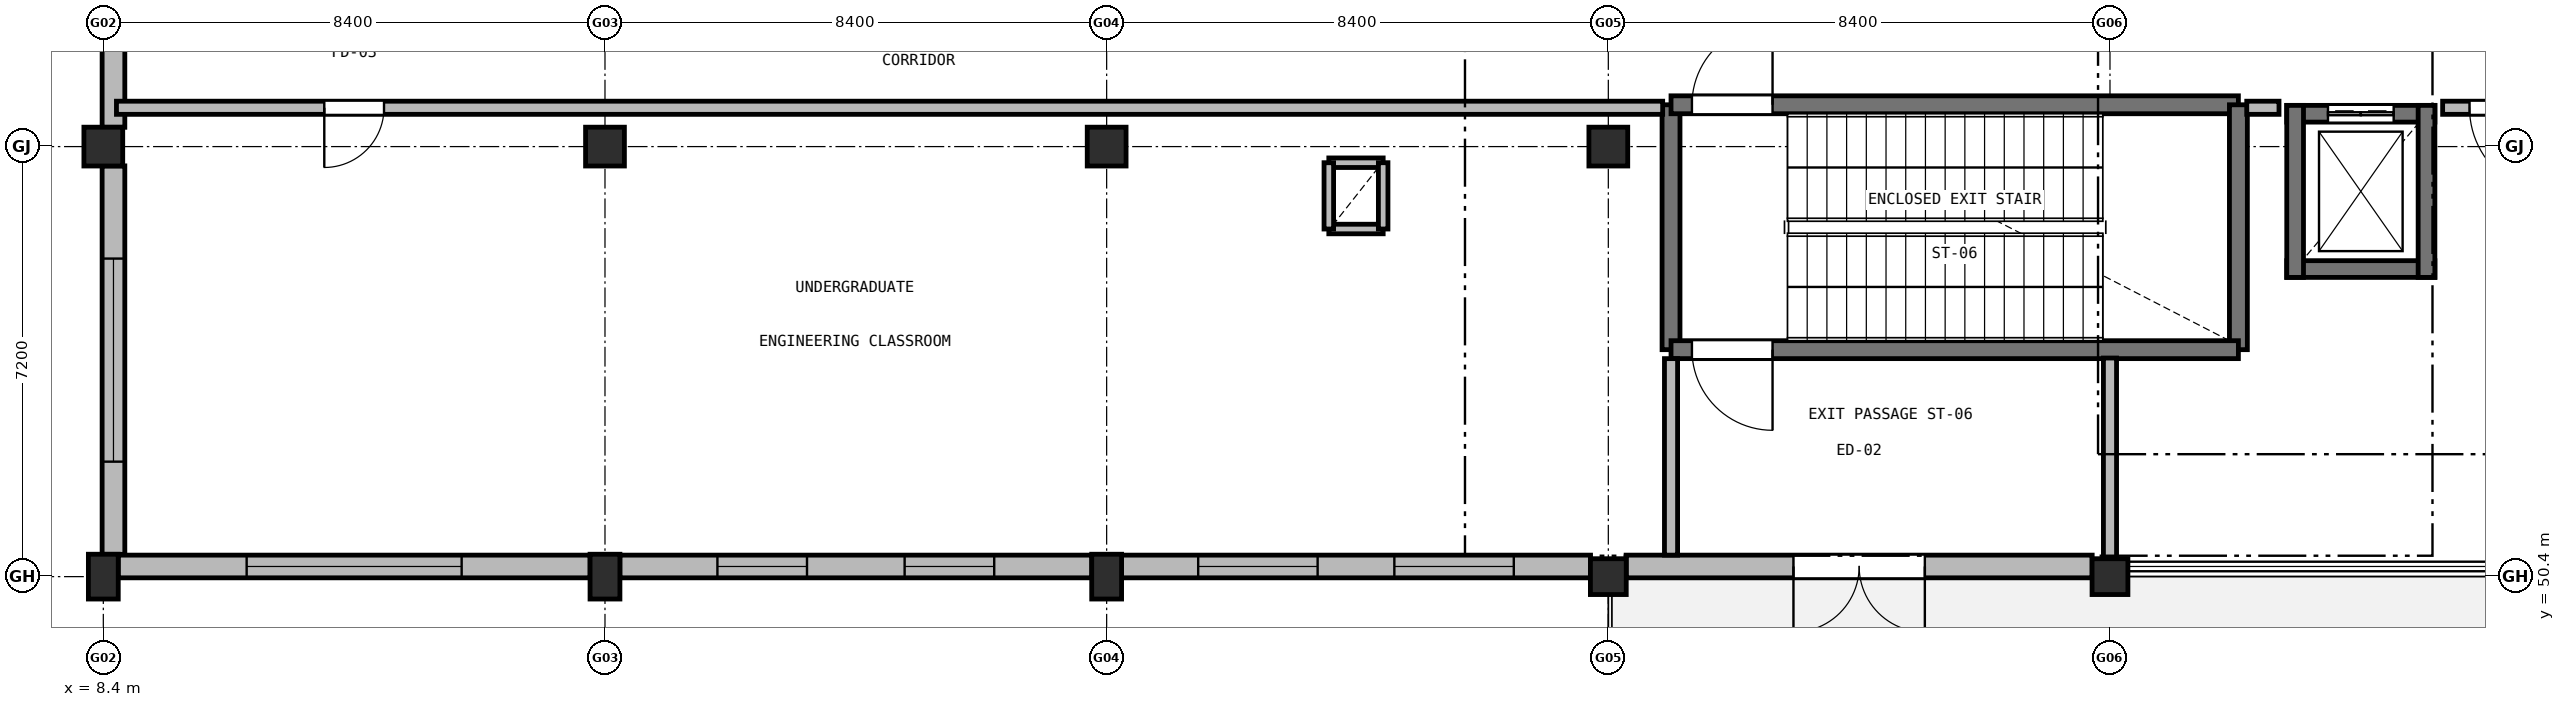
"""IFC4 building model, lengths in metres.
Left out: names, types, materials, properties, quantities, classifications, styles, units other than length and angle.
Written with IfcOpenShell. Run it as: python <this file> out.ifc"""

import sys

from ifc_helpers import new_model, si_unit, direction, frame, frame_2d, origin, origin_2d, place, context, subcontext, project, spatial, rectangle, circle, extrude, element, fill, save


model = new_model("IFC4")
c1 = context("Model", 3, precision=1e-05, world=origin(), true_north=direction((0.0, 1.0)))
c2 = subcontext(c1, "Body", "Model", "MODEL_VIEW")
j1 = project(units=[si_unit("LENGTHUNIT", "METRE"), si_unit("PLANEANGLEUNIT", "RADIAN")], contexts=[c1])
p1 = place(None, origin())
s1 = spatial("IfcSite", under=j1, at=p1, CompositionType="ELEMENT")
p2 = place(p1, origin())
s2 = spatial("IfcBuilding", under=s1, at=p2, CompositionType="ELEMENT")
p3 = place(p2, origin())
s3 = spatial("IfcBuildingStorey", under=s2, at=p3, CompositionType="ELEMENT", Elevation=0.0)
p4 = place(p3, frame((8.4, 50.4, 0.0), z_axis=(0.0, 0.0, 1.0), x_axis=(1.0, 0.0, 0.0)))
e1 = element("IfcColumn", 1, at=p4, inside=s3, PredefinedType="COLUMN", context=c2, shape_type="SweptSolid", body=[
    extrude(rectangle(XDim=0.5, YDim=0.75, at=origin_2d()), origin(), (0.0, 0.0, 1.0), 5.1),
])
p5 = place(p3, frame((8.4, 57.6, 0.0), z_axis=(0.0, 0.0, 1.0), x_axis=(1.0, 0.0, 0.0)))
e2 = element("IfcColumn", 2, at=p5, inside=s3, PredefinedType="COLUMN", context=c2, shape_type="SweptSolid", body=[
    extrude(rectangle(XDim=0.65, YDim=0.65, at=origin_2d()), origin(), (0.0, 0.0, 1.0), 5.1),
])
p6 = place(p3, frame((16.8, 50.4, 0.0), z_axis=(0.0, 0.0, 1.0), x_axis=(1.0, 0.0, 0.0)))
e3 = element("IfcColumn", 3, at=p6, inside=s3, PredefinedType="COLUMN", context=c2, shape_type="SweptSolid", body=[
    extrude(rectangle(XDim=0.5, YDim=0.75, at=origin_2d()), origin(), (0.0, 0.0, 1.0), 5.1),
])
p7 = place(p3, frame((16.8, 57.6, 0.0), z_axis=(0.0, 0.0, 1.0), x_axis=(1.0, 0.0, 0.0)))
e4 = element("IfcColumn", 4, at=p7, inside=s3, PredefinedType="COLUMN", context=c2, shape_type="SweptSolid", body=[
    extrude(rectangle(XDim=0.65, YDim=0.65, at=origin_2d()), origin(), (0.0, 0.0, 1.0), 5.1),
])
p8 = place(p3, frame((25.2, 50.4, 0.0), z_axis=(0.0, 0.0, 1.0), x_axis=(1.0, 0.0, 0.0)))
e5 = element("IfcColumn", 5, at=p8, inside=s3, PredefinedType="COLUMN", context=c2, shape_type="SweptSolid", body=[
    extrude(rectangle(XDim=0.5, YDim=0.75, at=origin_2d()), origin(), (0.0, 0.0, 1.0), 5.1),
])
p9 = place(p3, frame((25.2, 57.6, 0.0), z_axis=(0.0, 0.0, 1.0), x_axis=(1.0, 0.0, 0.0)))
e6 = element("IfcColumn", 6, at=p9, inside=s3, PredefinedType="COLUMN", context=c2, shape_type="SweptSolid", body=[
    extrude(rectangle(XDim=0.65, YDim=0.65, at=origin_2d()), origin(), (0.0, 0.0, 1.0), 5.1),
])
p10 = place(p3, frame((33.6, 50.4, 0.0), z_axis=(0.0, 0.0, 1.0), x_axis=(1.0, 0.0, 0.0)))
e7 = element("IfcColumn", 7, at=p10, inside=s3, PredefinedType="COLUMN", context=c2, shape_type="SweptSolid", body=[
    extrude(circle(Radius=0.3, at=origin_2d()), origin(), (0.0, 0.0, 1.0), 5.1),
])
p11 = place(p3, frame((33.6, 57.6, 0.0), z_axis=(0.0, 0.0, 1.0), x_axis=(1.0, 0.0, 0.0)))
e8 = element("IfcColumn", 8, at=p11, inside=s3, PredefinedType="COLUMN", context=c2, shape_type="SweptSolid", body=[
    extrude(rectangle(XDim=0.65, YDim=0.65, at=origin_2d()), origin(), (0.0, 0.0, 1.0), 5.1),
])
p12 = place(p3, frame((42.0, 50.4, 0.0), z_axis=(0.0, 0.0, 1.0), x_axis=(1.0, 0.0, 0.0)))
e9 = element("IfcColumn", 9, at=p12, inside=s3, PredefinedType="COLUMN", context=c2, shape_type="SweptSolid", body=[
    extrude(circle(Radius=0.3, at=origin_2d()), origin(), (0.0, 0.0, 1.0), 5.1),
])
p13 = place(p3, frame((41.702, 50.57, 0.0), z_axis=(0.0, 0.0, 1.0), x_axis=(-1.0, 0.0, 0.0)))
e10 = element("IfcWall", 10, at=p13, inside=s3, PredefinedType="SOLIDWALL", context=c2, shape_type="SweptSolid", body=[
    extrude(rectangle(XDim=7.804, YDim=0.38, at=frame_2d((3.902, 0.0))), origin(), (0.0, 0.0, 1.0), 4.01),
])
p14 = place(p13, frame((2.802, 0.0, 0.0)))
e11 = element("IfcOpeningElement", 11, at=p14, cuts=e10, PredefinedType="OPENING", context=c2, shape_type="SweptSolid", body=[
    extrude(rectangle(XDim=2.2, YDim=2.4, at=frame_2d((1.1, 1.2))), frame((0.0, 0.2, 0.0), z_axis=(0.0, -1.0, 0.0), x_axis=(1.0, 0.0, 0.0)), (0.0, 0.0, 1.0), 0.4),
])
p15 = place(p3, frame((33.302, 50.57, 0.0), z_axis=(0.0, 0.0, 1.0), x_axis=(-1.0, 0.0, 0.0)))
e12 = element("IfcWall", 12, at=p15, inside=s3, PredefinedType="SOLIDWALL", context=c2, shape_type="SweptSolid", body=[
    extrude(rectangle(XDim=7.854, YDim=0.38, at=frame_2d((3.927, 0.0))), origin(), (0.0, 0.0, 1.0), 4.01),
])
p16 = place(p15, frame((1.285, 0.0, 0.95)))
e13 = element("IfcOpeningElement", 13, at=p16, cuts=e12, PredefinedType="OPENING", context=c2, shape_type="SweptSolid", body=[
    extrude(rectangle(XDim=2.0, YDim=1.5, at=frame_2d((1.0, 0.75))), frame((0.0, 0.2, 0.0), z_axis=(0.0, -1.0, 0.0), x_axis=(1.0, 0.0, 0.0)), (0.0, 0.0, 1.0), 0.4),
])
p17 = place(p15, frame((4.569, 0.0, 0.95)))
e14 = element("IfcOpeningElement", 14, at=p17, cuts=e12, PredefinedType="OPENING", context=c2, shape_type="SweptSolid", body=[
    extrude(rectangle(XDim=2.0, YDim=1.5, at=frame_2d((1.0, 0.75))), frame((0.0, 0.2, 0.0), z_axis=(0.0, -1.0, 0.0), x_axis=(1.0, 0.0, 0.0)), (0.0, 0.0, 1.0), 0.4),
])
p18 = place(p3, frame((24.952, 50.57, 0.0), z_axis=(0.0, 0.0, 1.0), x_axis=(-1.0, 0.0, 0.0)))
e15 = element("IfcWall", 15, at=p18, inside=s3, PredefinedType="SOLIDWALL", context=c2, shape_type="SweptSolid", body=[
    extrude(rectangle(XDim=7.904, YDim=0.38, at=frame_2d((3.952, 0.0))), origin(), (0.0, 0.0, 1.0), 4.01),
])
p19 = place(p18, frame((1.635, 0.0, 0.95)))
e16 = element("IfcOpeningElement", 16, at=p19, cuts=e15, PredefinedType="OPENING", context=c2, shape_type="SweptSolid", body=[
    extrude(rectangle(XDim=1.5, YDim=1.4, at=frame_2d((0.75, 0.7))), frame((0.0, 0.2, 0.0), z_axis=(0.0, -1.0, 0.0), x_axis=(1.0, 0.0, 0.0)), (0.0, 0.0, 1.0), 0.4),
])
p20 = place(p18, frame((4.769, 0.0, 0.95)))
e17 = element("IfcOpeningElement", 17, at=p20, cuts=e15, PredefinedType="OPENING", context=c2, shape_type="SweptSolid", body=[
    extrude(rectangle(XDim=1.5, YDim=1.4, at=frame_2d((0.75, 0.7))), frame((0.0, 0.2, 0.0), z_axis=(0.0, -1.0, 0.0), x_axis=(1.0, 0.0, 0.0)), (0.0, 0.0, 1.0), 0.4),
])
p21 = place(p3, frame((16.552, 50.57, 0.0), z_axis=(0.0, 0.0, 1.0), x_axis=(-1.0, 0.0, 0.0)))
e18 = element("IfcWall", 18, at=p21, inside=s3, PredefinedType="SOLIDWALL", context=c2, shape_type="SweptSolid", body=[
    extrude(rectangle(XDim=7.904, YDim=0.38, at=frame_2d((3.952, 0.0))), origin(), (0.0, 0.0, 1.0), 4.01),
])
p22 = place(p21, frame((2.152, 0.0, 0.95)))
e19 = element("IfcOpeningElement", 19, at=p22, cuts=e18, PredefinedType="OPENING", context=c2, shape_type="SweptSolid", body=[
    extrude(rectangle(XDim=3.6, YDim=2.1, at=frame_2d((1.8, 1.05))), frame((0.0, 0.2, 0.0), z_axis=(0.0, -1.0, 0.0), x_axis=(1.0, 0.0, 0.0)), (0.0, 0.0, 1.0), 0.4),
])
p23 = place(p3, frame((8.57, 50.773, 0.0), z_axis=(0.0, 0.0, 1.0), x_axis=(0.0, 1.0, 0.0)))
e20 = element("IfcWall", 20, at=p23, inside=s3, PredefinedType="SOLIDWALL", context=c2, shape_type="SweptSolid", body=[
    extrude(rectangle(XDim=6.504, YDim=0.38, at=frame_2d((3.252, 0.0))), origin(), (0.0, 0.0, 1.0), 4.11),
])
p24 = place(p23, frame((1.552, 0.0, 0.95)))
e21 = element("IfcOpeningElement", 21, at=p24, cuts=e20, PredefinedType="OPENING", context=c2, shape_type="SweptSolid", body=[
    extrude(rectangle(XDim=3.4, YDim=1.8, at=frame_2d((1.7, 0.9))), frame((0.0, 0.2, 0.0), z_axis=(0.0, -1.0, 0.0), x_axis=(1.0, 0.0, 0.0)), (0.0, 0.0, 1.0), 0.4),
])
p25 = place(p3, frame((8.57, 57.923, 0.0), z_axis=(0.0, 0.0, 1.0), x_axis=(0.0, 1.0, 0.0)))
e22 = element("IfcWall", 22, at=p25, inside=s3, PredefinedType="SOLIDWALL", context=c2, shape_type="SweptSolid", body=[
    extrude(rectangle(XDim=6.554, YDim=0.38, at=frame_2d((3.277, 0.0))), origin(), (0.0, 0.0, 1.0), 4.11),
])
p26 = place(p3, frame((34.65, 54.2, 0.0), z_axis=(0.0, 0.0, 1.0), x_axis=(0.0, 1.0, 0.0)))
e23 = element("IfcWall", 23, at=p26, inside=s3, PredefinedType="SHEAR", context=c2, shape_type="SweptSolid", body=[
    extrude(rectangle(XDim=4.1, YDim=0.3, at=frame_2d((2.05, 0.0))), origin(), (0.0, 0.0, 1.0), 4.82),
])
p27 = place(p3, frame((34.65, 58.3, 0.0), z_axis=(0.0, 0.0, 1.0), x_axis=(1.0, 0.0, 0.0)))
e24 = element("IfcWall", 24, at=p27, inside=s3, PredefinedType="SHEAR", context=c2, shape_type="SweptSolid", body=[
    extrude(rectangle(XDim=9.5, YDim=0.3, at=frame_2d((4.75, 0.0))), origin(), (0.0, 0.0, 1.0), 4.82),
])
p28 = place(p27, frame((0.35, 0.0, 0.0)))
e25 = element("IfcOpeningElement", 25, at=p28, cuts=e24, PredefinedType="OPENING", context=c2, shape_type="SweptSolid", body=[
    extrude(rectangle(XDim=1.35, YDim=2.2, at=frame_2d((0.675, 1.1))), frame((0.0, 0.16, 0.0), z_axis=(0.0, -1.0, 0.0), x_axis=(1.0, 0.0, 0.0)), (0.0, 0.0, 1.0), 0.32),
])
p29 = place(p3, frame((44.15, 58.3, 0.0), z_axis=(0.0, 0.0, 1.0), x_axis=(0.0, -1.0, 0.0)))
e26 = element("IfcWall", 26, at=p29, inside=s3, PredefinedType="SHEAR", context=c2, shape_type="SweptSolid", body=[
    extrude(rectangle(XDim=4.1, YDim=0.3, at=frame_2d((2.05, 0.0))), origin(), (0.0, 0.0, 1.0), 4.82),
])
p30 = place(p3, frame((44.15, 54.2, 0.0), z_axis=(0.0, 0.0, 1.0), x_axis=(-1.0, 0.0, 0.0)))
e27 = element("IfcWall", 27, at=p30, inside=s3, PredefinedType="SHEAR", context=c2, shape_type="SweptSolid", body=[
    extrude(rectangle(XDim=9.5, YDim=0.3, at=frame_2d((4.75, 0.0))), origin(), (0.0, 0.0, 1.0), 4.82),
])
p31 = place(p30, frame((7.8, 0.0, 0.0)))
e28 = element("IfcOpeningElement", 28, at=p31, cuts=e27, PredefinedType="OPENING", context=c2, shape_type="SweptSolid", body=[
    extrude(rectangle(XDim=1.35, YDim=2.2, at=frame_2d((0.675, 1.1))), frame((0.0, 0.16, 0.0), z_axis=(0.0, -1.0, 0.0), x_axis=(1.0, 0.0, 0.0)), (0.0, 0.0, 1.0), 0.32),
])
p32 = place(p3, frame((47.44, 55.55, 0.0), z_axis=(0.0, 0.0, 1.0), x_axis=(-1.0, 0.0, 0.0)))
e29 = element("IfcWall", 29, at=p32, inside=s3, PredefinedType="SHEAR", context=c2, shape_type="SweptSolid", body=[
    extrude(rectangle(XDim=2.48, YDim=0.28, at=frame_2d((1.24, 0.0))), origin(), (0.0, 0.0, 1.0), 4.82),
])
p33 = place(p3, frame((44.96, 58.15, 0.0), z_axis=(0.0, 0.0, 1.0), x_axis=(1.0, 0.0, 0.0)))
e30 = element("IfcWall", 30, at=p33, inside=s3, PredefinedType="SHEAR", context=c2, shape_type="SweptSolid", body=[
    extrude(rectangle(XDim=2.48, YDim=0.28, at=frame_2d((1.24, 0.0))), origin(), (0.0, 0.0, 1.0), 4.82),
])
p34 = place(p33, frame((0.69, 0.0, 0.0)))
e31 = element("IfcOpeningElement", 31, at=p34, cuts=e30, PredefinedType="OPENING", context=c2, shape_type="SweptSolid", body=[
    extrude(rectangle(XDim=1.1, YDim=2.15, at=frame_2d((0.55, 1.075))), frame((0.0, 0.15, 0.0), z_axis=(0.0, -1.0, 0.0), x_axis=(1.0, 0.0, 0.0)), (0.0, 0.0, 1.0), 0.3),
])
for number, where, z_axis, x_axis in (
    (32, (45.1, 55.41, 0.0), (0.0, 0.0, 1.0), (0.0, 1.0, 0.0)),
    (33, (47.3, 58.29, 0.0), (0.0, 0.0, 1.0), (0.0, -1.0, 0.0)),
):
    element("IfcWall", number, at=place(p3, frame(where, z_axis=z_axis, x_axis=x_axis)), inside=s3, PredefinedType="SHEAR", context=c2, shape_type="SweptSolid", body=[
        extrude(rectangle(XDim=2.88, YDim=0.28, at=frame_2d((1.44, 0.0))), origin(), (0.0, 0.0, 1.0), 4.82),
    ])
p35 = place(p3, frame((28.92, 56.22, 0.0), z_axis=(0.0, 0.0, 1.0), x_axis=(1.0, 0.0, 0.0)))
e34 = element("IfcWall", 34, at=p35, inside=s3, PredefinedType="PARTITIONING", context=c2, shape_type="SweptSolid", body=[
    extrude(rectangle(XDim=0.91, YDim=0.16, at=frame_2d((0.455, 0.0))), origin(), (0.0, 0.0, 1.0), 4.55),
])
p36 = place(p3, frame((29.83, 57.33, 0.0), z_axis=(0.0, 0.0, 1.0), x_axis=(-1.0, 0.0, 0.0)))
e35 = element("IfcWall", 35, at=p36, inside=s3, PredefinedType="PARTITIONING", context=c2, shape_type="SweptSolid", body=[
    extrude(rectangle(XDim=0.91, YDim=0.16, at=frame_2d((0.455, 0.0))), origin(), (0.0, 0.0, 1.0), 4.005),
])
for number, where, z_axis, x_axis in (
    (36, (28.92, 57.33, 0.0), (0.0, 0.0, 1.0), (0.0, -1.0, 0.0)),
    (37, (29.83, 56.22, 0.0), (0.0, 0.0, 1.0), (0.0, 1.0, 0.0)),
):
    element("IfcWall", number, at=place(p3, frame(where, z_axis=z_axis, x_axis=x_axis)), inside=s3, PredefinedType="PARTITIONING", context=c2, shape_type="SweptSolid", body=[
        extrude(rectangle(XDim=1.11, YDim=0.16, at=frame_2d((0.555, 0.0))), origin(), (0.0, 0.0, 1.0), 4.005),
    ])
p37 = place(p3, frame((34.51, 58.25, 0.0), z_axis=(0.0, 0.0, 1.0), x_axis=(-1.0, 0.0, 0.0)))
e38 = element("IfcWall", 38, at=p37, inside=s3, PredefinedType="SOLIDWALL", context=c2, shape_type="SweptSolid", body=[
    extrude(rectangle(XDim=25.89, YDim=0.22, at=frame_2d((12.945, 0.0))), origin(), (0.0, 0.0, 1.0), 4.105),
])
p38 = place(p37, frame((21.41, 0.0, 0.0)))
e39 = element("IfcOpeningElement", 39, at=p38, cuts=e38, PredefinedType="OPENING", context=c2, shape_type="SweptSolid", body=[
    extrude(rectangle(XDim=1.0, YDim=2.1, at=frame_2d((0.5, 1.05))), frame((0.0, 0.12, 0.0), z_axis=(0.0, -1.0, 0.0), x_axis=(1.0, 0.0, 0.0)), (0.0, 0.0, 1.0), 0.24),
])
p39 = place(p3, frame((42.0, 50.72, 0.0), z_axis=(0.0, 0.0, 1.0), x_axis=(0.0, 1.0, 0.0)))
e40 = element("IfcWall", 40, at=p39, inside=s3, PredefinedType="SOLIDWALL", context=c2, shape_type="SweptSolid", body=[
    extrude(rectangle(XDim=3.34, YDim=0.22, at=frame_2d((1.67, 0.0))), origin(), (0.0, 0.0, 1.0), 4.005),
])
p40 = place(p3, frame((84.0, 58.25, 0.0), z_axis=(0.0, 0.0, 1.0), x_axis=(-1.0, 0.0, 0.0)))
e41 = element("IfcWall", 41, at=p40, inside=s3, PredefinedType="SOLIDWALL", context=c2, shape_type="SweptSolid", body=[
    extrude(rectangle(XDim=36.43, YDim=0.22, at=frame_2d((18.215, 0.0))), origin(), (0.0, 0.0, 1.0), 4.105),
])
p41 = place(p40, frame((34.53, 0.0, 0.0)))
e42 = element("IfcOpeningElement", 42, at=p41, cuts=e41, PredefinedType="OPENING", context=c2, shape_type="SweptSolid", body=[
    extrude(rectangle(XDim=1.45, YDim=2.2, at=frame_2d((0.725, 1.1))), frame((0.0, 0.12, 0.0), z_axis=(0.0, -1.0, 0.0), x_axis=(1.0, 0.0, 0.0)), (0.0, 0.0, 1.0), 0.24),
])
p42 = place(p3, frame((44.83, 58.25, 0.0), z_axis=(0.0, 0.0, 1.0), x_axis=(-1.0, 0.0, 0.0)))
e43 = element("IfcWall", 43, at=p42, inside=s3, PredefinedType="SOLIDWALL", context=c2, shape_type="SweptSolid", body=[
    extrude(rectangle(XDim=0.54, YDim=0.22, at=frame_2d((0.27, 0.0))), origin(), (0.0, 0.0, 1.0), 4.75),
])
p43 = place(p3, frame((34.65, 50.76, 0.0), z_axis=(0.0, 0.0, 1.0), x_axis=(0.0, 1.0, 0.0)))
e44 = element("IfcWall", 44, at=p43, inside=s3, PredefinedType="SOLIDWALL", context=c2, shape_type="SweptSolid", body=[
    extrude(rectangle(XDim=3.29, YDim=0.22, at=frame_2d((1.645, 0.0))), origin(), (0.0, 0.0, 1.0), 4.005),
])
p44 = place(p14, origin())
e45 = element("IfcDoor", 45, at=p44, inside=s3, OperationType="DOUBLE_DOOR_SINGLE_SWING", PredefinedType="DOOR", context=c2, shape_type="SweptSolid", body=[
    extrude(rectangle(XDim=2.2, YDim=2.4, at=frame_2d((1.1, 1.2))), frame((0.0, 0.025, 0.0), z_axis=(0.0, -1.0, 0.0), x_axis=(1.0, 0.0, 0.0)), (0.0, 0.0, 1.0), 0.05),
])
fill(e11, e45)
p45 = place(p16, origin())
e46 = element("IfcWindow", 46, at=p45, inside=s3, PartitioningType="SINGLE_PANEL", PredefinedType="WINDOW", context=c2, shape_type="SweptSolid", body=[
    extrude(rectangle(XDim=2.0, YDim=1.5, at=frame_2d((1.0, 0.75))), frame((0.0, 0.03, 0.0), z_axis=(0.0, -1.0, 0.0), x_axis=(1.0, 0.0, 0.0)), (0.0, 0.0, 1.0), 0.06),
])
fill(e13, e46)
p46 = place(p17, origin())
e47 = element("IfcWindow", 47, at=p46, inside=s3, PartitioningType="SINGLE_PANEL", PredefinedType="WINDOW", context=c2, shape_type="SweptSolid", body=[
    extrude(rectangle(XDim=2.0, YDim=1.5, at=frame_2d((1.0, 0.75))), frame((0.0, 0.03, 0.0), z_axis=(0.0, -1.0, 0.0), x_axis=(1.0, 0.0, 0.0)), (0.0, 0.0, 1.0), 0.06),
])
fill(e14, e47)
p47 = place(p19, origin())
e48 = element("IfcWindow", 48, at=p47, inside=s3, PartitioningType="SINGLE_PANEL", PredefinedType="WINDOW", context=c2, shape_type="SweptSolid", body=[
    extrude(rectangle(XDim=1.5, YDim=1.4, at=frame_2d((0.75, 0.7))), frame((0.0, 0.03, 0.0), z_axis=(0.0, -1.0, 0.0), x_axis=(1.0, 0.0, 0.0)), (0.0, 0.0, 1.0), 0.06),
])
fill(e16, e48)
p48 = place(p20, origin())
e49 = element("IfcWindow", 49, at=p48, inside=s3, PartitioningType="SINGLE_PANEL", PredefinedType="WINDOW", context=c2, shape_type="SweptSolid", body=[
    extrude(rectangle(XDim=1.5, YDim=1.4, at=frame_2d((0.75, 0.7))), frame((0.0, 0.03, 0.0), z_axis=(0.0, -1.0, 0.0), x_axis=(1.0, 0.0, 0.0)), (0.0, 0.0, 1.0), 0.06),
])
fill(e17, e49)
p49 = place(p22, origin())
e50 = element("IfcWindow", 50, at=p49, inside=s3, PartitioningType="SINGLE_PANEL", PredefinedType="WINDOW", context=c2, shape_type="SweptSolid", body=[
    extrude(rectangle(XDim=3.6, YDim=2.1, at=frame_2d((1.8, 1.05))), frame((0.0, 0.03, 0.0), z_axis=(0.0, -1.0, 0.0), x_axis=(1.0, 0.0, 0.0)), (0.0, 0.0, 1.0), 0.06),
])
fill(e19, e50)
p50 = place(p24, origin())
e51 = element("IfcWindow", 51, at=p50, inside=s3, PartitioningType="SINGLE_PANEL", PredefinedType="WINDOW", context=c2, shape_type="SweptSolid", body=[
    extrude(rectangle(XDim=3.4, YDim=1.8, at=frame_2d((1.7, 0.9))), frame((0.0, 0.03, 0.0), z_axis=(0.0, -1.0, 0.0), x_axis=(1.0, 0.0, 0.0)), (0.0, 0.0, 1.0), 0.06),
])
fill(e21, e51)
p51 = place(p28, origin())
e52 = element("IfcDoor", 52, at=p51, inside=s3, OperationType="SINGLE_SWING_RIGHT", PredefinedType="DOOR", context=c2, shape_type="SweptSolid", body=[
    extrude(rectangle(XDim=1.35, YDim=2.2, at=frame_2d((0.675, 1.1))), frame((0.0, 0.025, 0.0), z_axis=(0.0, -1.0, 0.0), x_axis=(1.0, 0.0, 0.0)), (0.0, 0.0, 1.0), 0.05),
])
fill(e25, e52)
p52 = place(p34, origin())
e53 = element("IfcDoor", 53, at=p52, inside=s3, OperationType="DOUBLE_DOOR_SLIDING", PredefinedType="DOOR", context=c2, shape_type="SweptSolid", body=[
    extrude(rectangle(XDim=1.1, YDim=2.15, at=frame_2d((0.55, 1.075))), frame((0.0, 0.025, 0.0), z_axis=(0.0, -1.0, 0.0), x_axis=(1.0, 0.0, 0.0)), (0.0, 0.0, 1.0), 0.05),
])
fill(e31, e53)
p53 = place(p38, origin())
e54 = element("IfcDoor", 54, at=p53, inside=s3, OperationType="SINGLE_SWING_RIGHT", PredefinedType="DOOR", context=c2, shape_type="SweptSolid", body=[
    extrude(rectangle(XDim=1.0, YDim=2.1, at=frame_2d((0.5, 1.05))), frame((0.0, 0.025, 0.0), z_axis=(0.0, -1.0, 0.0), x_axis=(1.0, 0.0, 0.0)), (0.0, 0.0, 1.0), 0.05),
])
fill(e39, e54)
p54 = place(p41, origin())
e55 = element("IfcDoor", 55, at=p54, inside=s3, OperationType="SINGLE_SWING_LEFT", PredefinedType="DOOR", context=c2, shape_type="SweptSolid", body=[
    extrude(rectangle(XDim=1.45, YDim=2.2, at=frame_2d((0.725, 1.1))), frame((0.0, 0.025, 0.0), z_axis=(0.0, -1.0, 0.0), x_axis=(1.0, 0.0, 0.0)), (0.0, 0.0, 1.0), 0.05),
])
fill(e42, e55)
p55 = place(p31, origin())
e56 = element("IfcDoor", 56, at=p55, inside=s3, OperationType="SINGLE_SWING_LEFT", PredefinedType="DOOR", context=c2, shape_type="SweptSolid", body=[
    extrude(rectangle(XDim=1.35, YDim=2.2, at=frame_2d((0.675, 1.1))), frame((0.0, 0.025, 0.0), z_axis=(0.0, -1.0, 0.0), x_axis=(1.0, 0.0, 0.0)), (0.0, 0.0, 1.0), 0.05),
])
fill(e28, e56)
save(model, sys.argv[1])
